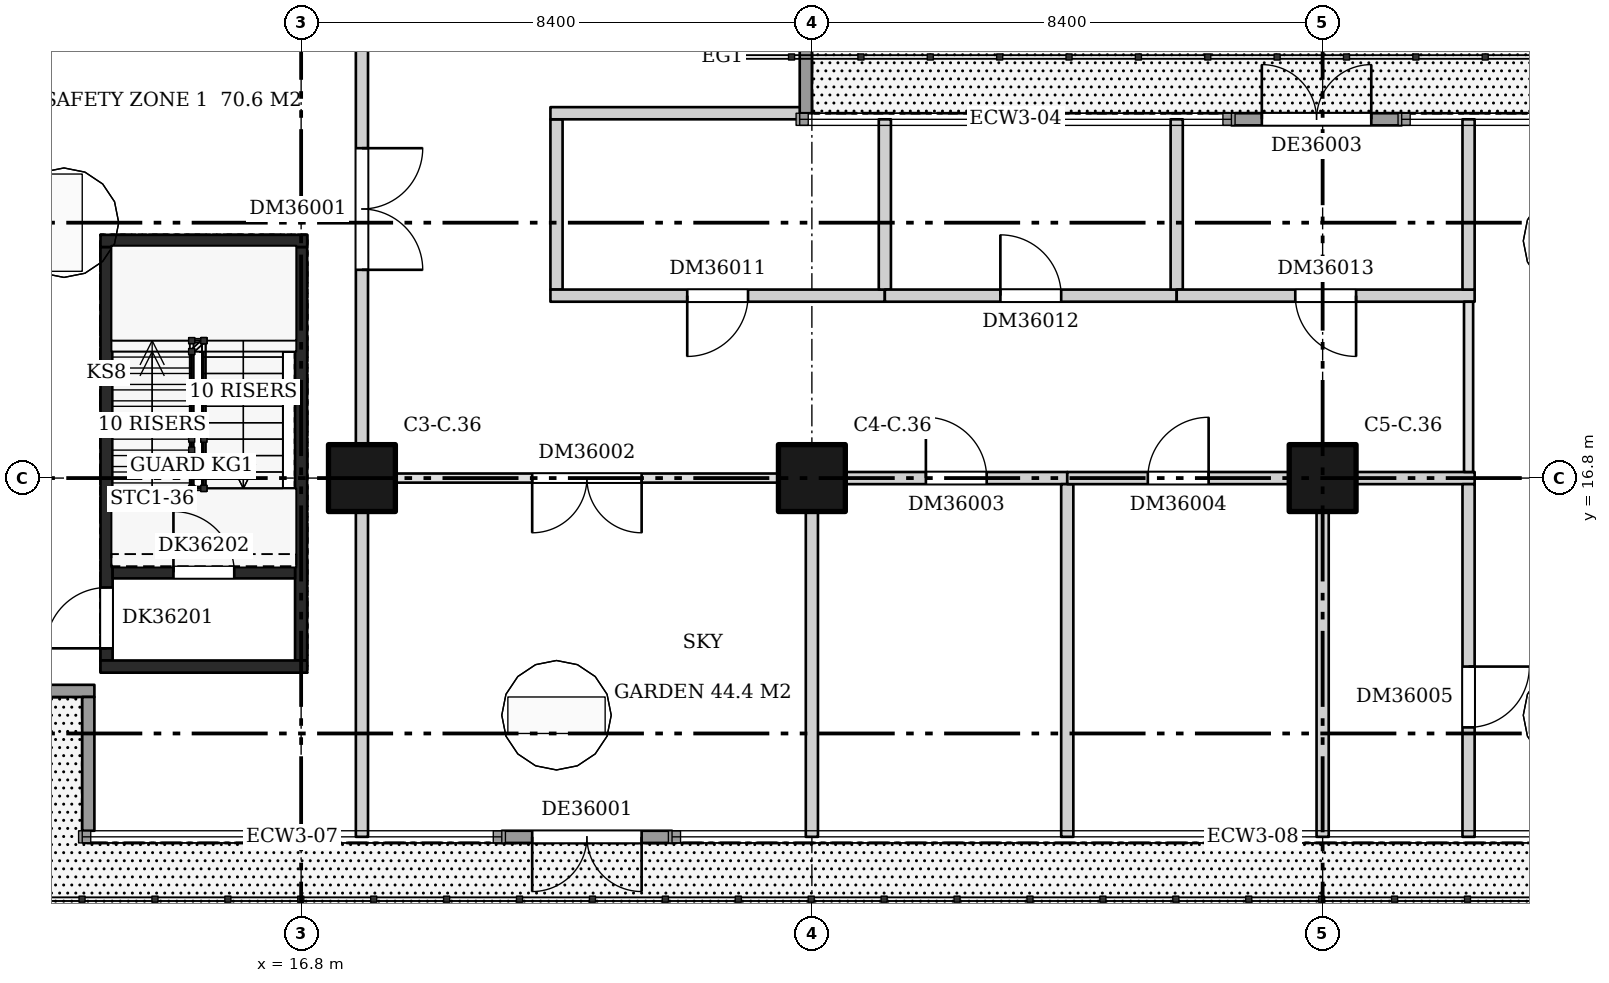
"""IFC4 building model, lengths in metres.
Left out: names, types, materials, properties, quantities, classifications, styles, units other than length and angle.
Written with IfcOpenShell. Run it as: python <this file> out.ifc"""

import sys

from ifc_helpers import new_model, si_unit, direction, frame, frame_2d, origin, origin_2d, place, context, subcontext, project, spatial, rectangle, extrude, element, fill, save


model = new_model("IFC4")
c1 = context("Model", 3, precision=1e-05, world=origin(), true_north=direction((0.0, 1.0)))
c2 = subcontext(c1, "Body", "Model", "MODEL_VIEW")
j1 = project(units=[si_unit("LENGTHUNIT", "METRE"), si_unit("PLANEANGLEUNIT", "RADIAN")], contexts=[c1])
p1 = place(None, origin())
s1 = spatial("IfcSite", under=j1, at=p1, CompositionType="ELEMENT")
p2 = place(p1, origin())
s2 = spatial("IfcBuilding", under=s1, at=p2, CompositionType="ELEMENT")
p3 = place(p2, frame((0.0, 0.0, 140.7)))
s3 = spatial("IfcBuildingStorey", under=s2, at=p3, CompositionType="ELEMENT", Elevation=140.7)
for number, where, z_axis, x_axis in (
    (1, (17.8, 16.8, 0.0), (0.0, 0.0, 1.0), (1.0, 0.0, 0.0)),
    (2, (25.2, 16.8, 0.0), (0.0, 0.0, 1.0), (1.0, 0.0, 0.0)),
    (3, (33.6, 16.8, 0.0), (0.0, 0.0, 1.0), (1.0, 0.0, 0.0)),
):
    element("IfcColumn", number, at=place(p3, frame(where, z_axis=z_axis, x_axis=x_axis)), inside=s3, PredefinedType="COLUMN", context=c2, shape_type="SweptSolid", body=[
        extrude(rectangle(XDim=1.1, YDim=1.1, at=origin_2d()), origin(), (0.0, 0.0, 1.0), 6.72),
    ])
p4 = place(p3, frame((13.6, 13.8, 0.0), z_axis=(0.0, 0.0, 1.0), x_axis=(0.0, 1.0, 0.0)))
e4 = element("IfcWall", 4, at=p4, inside=s3, PredefinedType="SHEAR", context=c2, shape_type="SweptSolid", body=[
    extrude(rectangle(XDim=6.8, YDim=0.2, at=frame_2d((3.4, 0.0))), origin(), (0.0, 0.0, 1.0), 6.72),
])
p5 = place(p4, frame((0.2, 0.0, 0.0)))
e5 = element("IfcOpeningElement", 5, at=p5, cuts=e4, PredefinedType="OPENING", context=c2, shape_type="SweptSolid", body=[
    extrude(rectangle(XDim=1.0, YDim=2.1, at=frame_2d((0.5, 1.05))), frame((0.0, 0.11, 0.0), z_axis=(0.0, -1.0, 0.0), x_axis=(1.0, 0.0, 0.0)), (0.0, 0.0, 1.0), 0.22),
])
p6 = place(p3, frame((16.8, 13.8, 0.0), z_axis=(0.0, 0.0, 1.0), x_axis=(0.0, 1.0, 0.0)))
e6 = element("IfcWall", 6, at=p6, inside=s3, PredefinedType="SHEAR", context=c2, shape_type="SweptSolid", body=[
    extrude(rectangle(XDim=6.8, YDim=0.2, at=frame_2d((3.4, 0.0))), origin(), (0.0, 0.0, 1.0), 6.72),
])
for number, where, z_axis, x_axis in (
    (7, (13.5, 13.7, 0.0), (0.0, 0.0, 1.0), (1.0, 0.0, 0.0)),
    (8, (13.5, 20.7, 0.0), (0.0, 0.0, 1.0), (1.0, 0.0, 0.0)),
):
    element("IfcWall", number, at=place(p3, frame(where, z_axis=z_axis, x_axis=x_axis)), inside=s3, PredefinedType="SHEAR", context=c2, shape_type="SweptSolid", body=[
        extrude(rectangle(XDim=3.4, YDim=0.2, at=frame_2d((1.7, 0.0))), origin(), (0.0, 0.0, 1.0), 6.72),
    ])
p7 = place(p3, frame((13.7, 15.25, 0.0), z_axis=(0.0, 0.0, 1.0), x_axis=(1.0, 0.0, 0.0)))
e9 = element("IfcWall", 9, at=p7, inside=s3, PredefinedType="SHEAR", context=c2, shape_type="SweptSolid", body=[
    extrude(rectangle(XDim=3.0, YDim=0.2, at=frame_2d((1.5, 0.0))), origin(), (0.0, 0.0, 1.0), 6.72),
])
p8 = place(p7, frame((1.0, 0.0, 0.0)))
e10 = element("IfcOpeningElement", 10, at=p8, cuts=e9, PredefinedType="OPENING", context=c2, shape_type="SweptSolid", body=[
    extrude(rectangle(XDim=1.0, YDim=2.1, at=frame_2d((0.5, 1.05))), frame((0.0, 0.11, 0.0), z_axis=(0.0, -1.0, 0.0), x_axis=(1.0, 0.0, 0.0)), (0.0, 0.0, 1.0), 0.22),
])
p9 = place(p3, frame((17.8, 10.9, 0.0), z_axis=(0.0, 0.0, 1.0), x_axis=(0.0, 1.0, 0.0)))
e11 = element("IfcWall", 11, at=p9, inside=s3, PredefinedType="PARTITIONING", context=c2, shape_type="SweptSolid", body=[
    extrude(rectangle(XDim=5.35, YDim=0.2, at=frame_2d((2.675, 0.0))), origin(), (0.0, 0.0, 1.0), 6.72),
])
p10 = place(p3, frame((17.8, 17.35, 0.0), z_axis=(0.0, 0.0, 1.0), x_axis=(0.0, 1.0, 0.0)))
e12 = element("IfcWall", 12, at=p10, inside=s3, PredefinedType="PARTITIONING", context=c2, shape_type="SweptSolid", body=[
    extrude(rectangle(XDim=7.75, YDim=0.2, at=frame_2d((3.875, 0.0))), origin(), (0.0, 0.0, 1.0), 6.72),
])
p11 = place(p10, frame((2.875, 0.0, 0.0)))
e13 = element("IfcOpeningElement", 13, at=p11, cuts=e12, PredefinedType="OPENING", context=c2, shape_type="SweptSolid", body=[
    extrude(rectangle(XDim=2.0, YDim=2.1, at=frame_2d((1.0, 1.05))), frame((0.0, 0.11, 0.0), z_axis=(0.0, -1.0, 0.0), x_axis=(1.0, 0.0, 0.0)), (0.0, 0.0, 1.0), 0.22),
])
p12 = place(p3, frame((18.35, 16.8, 0.0), z_axis=(0.0, 0.0, 1.0), x_axis=(1.0, 0.0, 0.0)))
e14 = element("IfcWall", 14, at=p12, inside=s3, PredefinedType="PARTITIONING", context=c2, shape_type="SweptSolid", body=[
    extrude(rectangle(XDim=6.3, YDim=0.15, at=frame_2d((3.15, 0.0))), origin(), (0.0, 0.0, 1.0), 6.72),
])
p13 = place(p12, frame((2.25, 0.0, 0.0)))
e15 = element("IfcOpeningElement", 15, at=p13, cuts=e14, PredefinedType="OPENING", context=c2, shape_type="SweptSolid", body=[
    extrude(rectangle(XDim=1.8, YDim=2.1, at=frame_2d((0.9, 1.05))), frame((0.0, 0.085, 0.0), z_axis=(0.0, -1.0, 0.0), x_axis=(1.0, 0.0, 0.0)), (0.0, 0.0, 1.0), 0.17),
])
p14 = place(p3, frame((21.0, 19.9, 0.0), z_axis=(0.0, 0.0, 1.0), x_axis=(0.0, 1.0, 0.0)))
e16 = element("IfcWall", 16, at=p14, inside=s3, PredefinedType="PARTITIONING", context=c2, shape_type="SweptSolid", body=[
    extrude(rectangle(XDim=2.8, YDim=0.2, at=frame_2d((1.4, 0.0))), origin(), (0.0, 0.0, 1.0), 6.72),
])
p15 = place(p3, frame((20.9, 19.8, 0.0), z_axis=(0.0, 0.0, 1.0), x_axis=(1.0, 0.0, 0.0)))
e17 = element("IfcWall", 17, at=p15, inside=s3, PredefinedType="PARTITIONING", context=c2, shape_type="SweptSolid", body=[
    extrude(rectangle(XDim=5.5, YDim=0.2, at=frame_2d((2.75, 0.0))), origin(), (0.0, 0.0, 1.0), 6.72),
])
p16 = place(p15, frame((2.25, 0.0, 0.0)))
e18 = element("IfcOpeningElement", 18, at=p16, cuts=e17, PredefinedType="OPENING", context=c2, shape_type="SweptSolid", body=[
    extrude(rectangle(XDim=1.0, YDim=2.1, at=frame_2d((0.5, 1.05))), frame((0.0, 0.11, 0.0), z_axis=(0.0, -1.0, 0.0), x_axis=(1.0, 0.0, 0.0)), (0.0, 0.0, 1.0), 0.22),
])
p17 = place(p3, frame((20.9, 22.8, 0.0), z_axis=(0.0, 0.0, 1.0), x_axis=(1.0, 0.0, 0.0)))
e19 = element("IfcWall", 19, at=p17, inside=s3, PredefinedType="PARTITIONING", context=c2, shape_type="SweptSolid", body=[
    extrude(rectangle(XDim=4.2, YDim=0.2, at=frame_2d((2.1, 0.0))), origin(), (0.0, 0.0, 1.0), 6.72),
])
p18 = place(p3, frame((25.2, 10.9, 0.0), z_axis=(0.0, 0.0, 1.0), x_axis=(0.0, 1.0, 0.0)))
e20 = element("IfcWall", 20, at=p18, inside=s3, PredefinedType="PARTITIONING", context=c2, shape_type="SweptSolid", body=[
    extrude(rectangle(XDim=5.35, YDim=0.2, at=frame_2d((2.675, 0.0))), origin(), (0.0, 0.0, 1.0), 6.72),
])
p19 = place(p3, frame((25.75, 16.8, 0.0), z_axis=(0.0, 0.0, 1.0), x_axis=(1.0, 0.0, 0.0)))
e21 = element("IfcWall", 21, at=p19, inside=s3, PredefinedType="PARTITIONING", context=c2, shape_type="SweptSolid", body=[
    extrude(rectangle(XDim=3.65, YDim=0.2, at=frame_2d((1.825, 0.0))), origin(), (0.0, 0.0, 1.0), 6.72),
])
p20 = place(p19, frame((1.325, 0.0, 0.0)))
e22 = element("IfcOpeningElement", 22, at=p20, cuts=e21, PredefinedType="OPENING", context=c2, shape_type="SweptSolid", body=[
    extrude(rectangle(XDim=1.0, YDim=2.1, at=frame_2d((0.5, 1.05))), frame((0.0, 0.11, 0.0), z_axis=(0.0, -1.0, 0.0), x_axis=(1.0, 0.0, 0.0)), (0.0, 0.0, 1.0), 0.22),
])
p21 = place(p3, frame((26.4, 19.9, 0.0), z_axis=(0.0, 0.0, 1.0), x_axis=(0.0, 1.0, 0.0)))
e23 = element("IfcWall", 23, at=p21, inside=s3, PredefinedType="PARTITIONING", context=c2, shape_type="SweptSolid", body=[
    extrude(rectangle(XDim=2.8, YDim=0.2, at=frame_2d((1.4, 0.0))), origin(), (0.0, 0.0, 1.0), 6.72),
])
p22 = place(p3, frame((26.4, 19.8, 0.0), z_axis=(0.0, 0.0, 1.0), x_axis=(1.0, 0.0, 0.0)))
e24 = element("IfcWall", 24, at=p22, inside=s3, PredefinedType="PARTITIONING", context=c2, shape_type="SweptSolid", body=[
    extrude(rectangle(XDim=4.8, YDim=0.2, at=frame_2d((2.4, 0.0))), origin(), (0.0, 0.0, 1.0), 6.72),
])
p23 = place(p22, frame((1.9, 0.0, 0.0)))
e25 = element("IfcOpeningElement", 25, at=p23, cuts=e24, PredefinedType="OPENING", context=c2, shape_type="SweptSolid", body=[
    extrude(rectangle(XDim=1.0, YDim=2.1, at=frame_2d((0.5, 1.05))), frame((0.0, 0.11, 0.0), z_axis=(0.0, -1.0, 0.0), x_axis=(1.0, 0.0, 0.0)), (0.0, 0.0, 1.0), 0.22),
])
p24 = place(p3, frame((29.4, 10.9, 0.0), z_axis=(0.0, 0.0, 1.0), x_axis=(0.0, 1.0, 0.0)))
e26 = element("IfcWall", 26, at=p24, inside=s3, PredefinedType="PARTITIONING", context=c2, shape_type="SweptSolid", body=[
    extrude(rectangle(XDim=5.8, YDim=0.2, at=frame_2d((2.9, 0.0))), origin(), (0.0, 0.0, 1.0), 6.72),
])
p25 = place(p3, frame((29.4, 16.8, 0.0), z_axis=(0.0, 0.0, 1.0), x_axis=(1.0, 0.0, 0.0)))
e27 = element("IfcWall", 27, at=p25, inside=s3, PredefinedType="PARTITIONING", context=c2, shape_type="SweptSolid", body=[
    extrude(rectangle(XDim=3.65, YDim=0.2, at=frame_2d((1.825, 0.0))), origin(), (0.0, 0.0, 1.0), 6.72),
])
p26 = place(p25, frame((1.325, 0.0, 0.0)))
e28 = element("IfcOpeningElement", 28, at=p26, cuts=e27, PredefinedType="OPENING", context=c2, shape_type="SweptSolid", body=[
    extrude(rectangle(XDim=1.0, YDim=2.1, at=frame_2d((0.5, 1.05))), frame((0.0, 0.11, 0.0), z_axis=(0.0, -1.0, 0.0), x_axis=(1.0, 0.0, 0.0)), (0.0, 0.0, 1.0), 0.22),
])
p27 = place(p3, frame((31.2, 19.9, 0.0), z_axis=(0.0, 0.0, 1.0), x_axis=(0.0, 1.0, 0.0)))
e29 = element("IfcWall", 29, at=p27, inside=s3, PredefinedType="PARTITIONING", context=c2, shape_type="SweptSolid", body=[
    extrude(rectangle(XDim=2.8, YDim=0.2, at=frame_2d((1.4, 0.0))), origin(), (0.0, 0.0, 1.0), 6.72),
])
p28 = place(p3, frame((31.2, 19.8, 0.0), z_axis=(0.0, 0.0, 1.0), x_axis=(1.0, 0.0, 0.0)))
e30 = element("IfcWall", 30, at=p28, inside=s3, PredefinedType="PARTITIONING", context=c2, shape_type="SweptSolid", body=[
    extrude(rectangle(XDim=4.9, YDim=0.2, at=frame_2d((2.45, 0.0))), origin(), (0.0, 0.0, 1.0), 6.72),
])
p29 = place(p28, frame((1.95, 0.0, 0.0)))
e31 = element("IfcOpeningElement", 31, at=p29, cuts=e30, PredefinedType="OPENING", context=c2, shape_type="SweptSolid", body=[
    extrude(rectangle(XDim=1.0, YDim=2.1, at=frame_2d((0.5, 1.05))), frame((0.0, 0.11, 0.0), z_axis=(0.0, -1.0, 0.0), x_axis=(1.0, 0.0, 0.0)), (0.0, 0.0, 1.0), 0.22),
])
p30 = place(p3, frame((33.6, 10.9, 0.0), z_axis=(0.0, 0.0, 1.0), x_axis=(0.0, 1.0, 0.0)))
e32 = element("IfcWall", 32, at=p30, inside=s3, PredefinedType="PARTITIONING", context=c2, shape_type="SweptSolid", body=[
    extrude(rectangle(XDim=5.35, YDim=0.2, at=frame_2d((2.675, 0.0))), origin(), (0.0, 0.0, 1.0), 6.72),
])
p31 = place(p3, frame((34.15, 16.8, 0.0), z_axis=(0.0, 0.0, 1.0), x_axis=(1.0, 0.0, 0.0)))
e33 = element("IfcWall", 33, at=p31, inside=s3, PredefinedType="PARTITIONING", context=c2, shape_type="SweptSolid", body=[
    extrude(rectangle(XDim=1.95, YDim=0.2, at=frame_2d((0.975, 0.0))), origin(), (0.0, 0.0, 1.0), 6.72),
])
p32 = place(p3, frame((36.0, 10.9, 0.0), z_axis=(0.0, 0.0, 1.0), x_axis=(0.0, 1.0, 0.0)))
e34 = element("IfcWall", 34, at=p32, inside=s3, PredefinedType="PARTITIONING", context=c2, shape_type="SweptSolid", body=[
    extrude(rectangle(XDim=5.8, YDim=0.2, at=frame_2d((2.9, 0.0))), origin(), (0.0, 0.0, 1.0), 6.72),
])
p33 = place(p32, frame((1.8, 0.0, 0.0)))
e35 = element("IfcOpeningElement", 35, at=p33, cuts=e34, PredefinedType="OPENING", context=c2, shape_type="SweptSolid", body=[
    extrude(rectangle(XDim=1.0, YDim=2.1, at=frame_2d((0.5, 1.05))), frame((0.0, 0.11, 0.0), z_axis=(0.0, -1.0, 0.0), x_axis=(1.0, 0.0, 0.0)), (0.0, 0.0, 1.0), 0.22),
])
p34 = place(p3, frame((36.0, 16.9, 0.0), z_axis=(0.0, 0.0, 1.0), x_axis=(0.0, 1.0, 0.0)))
e36 = element("IfcWall", 36, at=p34, inside=s3, PredefinedType="PARTITIONING", context=c2, shape_type="SweptSolid", body=[
    extrude(rectangle(XDim=2.8, YDim=0.15, at=frame_2d((1.4, 0.0))), origin(), (0.0, 0.0, 1.0), 6.72),
])
p35 = place(p3, frame((36.0, 19.9, 0.0), z_axis=(0.0, 0.0, 1.0), x_axis=(0.0, 1.0, 0.0)))
e37 = element("IfcWall", 37, at=p35, inside=s3, PredefinedType="PARTITIONING", context=c2, shape_type="SweptSolid", body=[
    extrude(rectangle(XDim=2.8, YDim=0.2, at=frame_2d((1.4, 0.0))), origin(), (0.0, 0.0, 1.0), 6.72),
])
p36 = place(p3, frame((10.8, 13.3, 0.0), z_axis=(0.0, 0.0, 1.0), x_axis=(1.0, 0.0, 0.0)))
e38 = element("IfcWall", 38, at=p36, inside=s3, PredefinedType="SOLIDWALL", context=c2, shape_type="SweptSolid", body=[
    extrude(rectangle(XDim=2.6, YDim=0.2, at=frame_2d((1.3, 0.0))), origin(), (0.0, 0.0, 1.0), 6.72),
])
p37 = place(p3, frame((13.3, 13.2, 0.0), z_axis=(0.0, 0.0, 1.0), x_axis=(0.0, -1.0, 0.0)))
e39 = element("IfcWall", 39, at=p37, inside=s3, PredefinedType="SOLIDWALL", context=c2, shape_type="SweptSolid", body=[
    extrude(rectangle(XDim=2.2, YDim=0.2, at=frame_2d((1.1, 0.0))), origin(), (0.0, 0.0, 1.0), 6.72),
])
p38 = place(p3, frame((20.1, 10.9, 0.0), z_axis=(0.0, 0.0, 1.0), x_axis=(1.0, 0.0, 0.0)))
e40 = element("IfcWall", 40, at=p38, inside=s3, PredefinedType="SOLIDWALL", context=c2, shape_type="SweptSolid", body=[
    extrude(rectangle(XDim=2.8, YDim=0.2, at=frame_2d((1.4, 0.0))), origin(), (0.0, 0.0, 1.0), 6.72),
])
p39 = place(p38, frame((0.5, 0.0, 0.0)))
e41 = element("IfcOpeningElement", 41, at=p39, cuts=e40, PredefinedType="OPENING", context=c2, shape_type="SweptSolid", body=[
    extrude(rectangle(XDim=1.8, YDim=2.4, at=frame_2d((0.9, 1.2))), frame((0.0, 0.11, 0.0), z_axis=(0.0, -1.0, 0.0), x_axis=(1.0, 0.0, 0.0)), (0.0, 0.0, 1.0), 0.22),
])
p40 = place(p3, frame((34.9, 22.7, 0.0), z_axis=(0.0, 0.0, 1.0), x_axis=(-1.0, 0.0, 0.0)))
e42 = element("IfcWall", 42, at=p40, inside=s3, PredefinedType="SOLIDWALL", context=c2, shape_type="SweptSolid", body=[
    extrude(rectangle(XDim=2.8, YDim=0.2, at=frame_2d((1.4, 0.0))), origin(), (0.0, 0.0, 1.0), 6.72),
])
p41 = place(p40, frame((0.5, 0.0, 0.0)))
e43 = element("IfcOpeningElement", 43, at=p41, cuts=e42, PredefinedType="OPENING", context=c2, shape_type="SweptSolid", body=[
    extrude(rectangle(XDim=1.8, YDim=2.4, at=frame_2d((0.9, 1.2))), frame((0.0, 0.11, 0.0), z_axis=(0.0, -1.0, 0.0), x_axis=(1.0, 0.0, 0.0)), (0.0, 0.0, 1.0), 0.22),
])
p42 = place(p3, frame((25.1, 22.8, 0.0), z_axis=(0.0, 0.0, 1.0), x_axis=(0.0, 1.0, 0.0)))
e44 = element("IfcWall", 44, at=p42, inside=s3, PredefinedType="SOLIDWALL", context=c2, shape_type="SweptSolid", body=[
    extrude(rectangle(XDim=1.8, YDim=0.2, at=frame_2d((0.9, 0.0))), origin(), (0.0, 0.0, 1.0), 6.72),
])
p43 = place(p5, origin())
e45 = element("IfcDoor", 45, at=p43, inside=s3, OperationType="SINGLE_SWING_LEFT", PredefinedType="DOOR", context=c2, shape_type="SweptSolid", body=[
    extrude(rectangle(XDim=1.0, YDim=2.1, at=frame_2d((0.5, 1.05))), frame((0.0, 0.025, 0.0), z_axis=(0.0, -1.0, 0.0), x_axis=(1.0, 0.0, 0.0)), (0.0, 0.0, 1.0), 0.05),
])
fill(e5, e45)
p44 = place(p8, origin())
e46 = element("IfcDoor", 46, at=p44, inside=s3, OperationType="SINGLE_SWING_LEFT", PredefinedType="DOOR", context=c2, shape_type="SweptSolid", body=[
    extrude(rectangle(XDim=1.0, YDim=2.1, at=frame_2d((0.5, 1.05))), frame((0.0, 0.025, 0.0), z_axis=(0.0, -1.0, 0.0), x_axis=(1.0, 0.0, 0.0)), (0.0, 0.0, 1.0), 0.05),
])
fill(e10, e46)
p45 = place(p11, frame((2.0, 0.0, 0.0), z_axis=(0.0, 0.0, 1.0), x_axis=(-1.0, 0.0, 0.0)))
e47 = element("IfcDoor", 47, at=p45, inside=s3, OperationType="DOUBLE_DOOR_SINGLE_SWING", PredefinedType="DOOR", context=c2, shape_type="SweptSolid", body=[
    extrude(rectangle(XDim=2.0, YDim=2.1, at=frame_2d((1.0, 1.05))), frame((0.0, 0.025, 0.0), z_axis=(0.0, -1.0, 0.0), x_axis=(1.0, 0.0, 0.0)), (0.0, 0.0, 1.0), 0.05),
])
fill(e13, e47)
p46 = place(p13, frame((1.8, 0.0, 0.0), z_axis=(0.0, 0.0, 1.0), x_axis=(-1.0, 0.0, 0.0)))
e48 = element("IfcDoor", 48, at=p46, inside=s3, OperationType="DOUBLE_DOOR_SINGLE_SWING", PredefinedType="DOOR", context=c2, shape_type="SweptSolid", body=[
    extrude(rectangle(XDim=1.8, YDim=2.1, at=frame_2d((0.9, 1.05))), frame((0.0, 0.025, 0.0), z_axis=(0.0, -1.0, 0.0), x_axis=(1.0, 0.0, 0.0)), (0.0, 0.0, 1.0), 0.05),
])
fill(e15, e48)
p47 = place(p20, origin())
e49 = element("IfcDoor", 49, at=p47, inside=s3, OperationType="SINGLE_SWING_LEFT", PredefinedType="DOOR", context=c2, shape_type="SweptSolid", body=[
    extrude(rectangle(XDim=1.0, YDim=2.1, at=frame_2d((0.5, 1.05))), frame((0.0, 0.025, 0.0), z_axis=(0.0, -1.0, 0.0), x_axis=(1.0, 0.0, 0.0)), (0.0, 0.0, 1.0), 0.05),
])
fill(e22, e49)
p48 = place(p26, origin())
e50 = element("IfcDoor", 50, at=p48, inside=s3, OperationType="SINGLE_SWING_RIGHT", PredefinedType="DOOR", context=c2, shape_type="SweptSolid", body=[
    extrude(rectangle(XDim=1.0, YDim=2.1, at=frame_2d((0.5, 1.05))), frame((0.0, 0.025, 0.0), z_axis=(0.0, -1.0, 0.0), x_axis=(1.0, 0.0, 0.0)), (0.0, 0.0, 1.0), 0.05),
])
fill(e28, e50)
p49 = place(p33, frame((1.0, 0.0, 0.0), z_axis=(0.0, 0.0, 1.0), x_axis=(-1.0, 0.0, 0.0)))
e51 = element("IfcDoor", 51, at=p49, inside=s3, OperationType="SINGLE_SWING_LEFT", PredefinedType="DOOR", context=c2, shape_type="SweptSolid", body=[
    extrude(rectangle(XDim=1.0, YDim=2.1, at=frame_2d((0.5, 1.05))), frame((0.0, 0.025, 0.0), z_axis=(0.0, -1.0, 0.0), x_axis=(1.0, 0.0, 0.0)), (0.0, 0.0, 1.0), 0.05),
])
fill(e35, e51)
p50 = place(p16, frame((1.0, 0.0, 0.0), z_axis=(0.0, 0.0, 1.0), x_axis=(-1.0, 0.0, 0.0)))
e52 = element("IfcDoor", 52, at=p50, inside=s3, OperationType="SINGLE_SWING_RIGHT", PredefinedType="DOOR", context=c2, shape_type="SweptSolid", body=[
    extrude(rectangle(XDim=1.0, YDim=2.1, at=frame_2d((0.5, 1.05))), frame((0.0, 0.025, 0.0), z_axis=(0.0, -1.0, 0.0), x_axis=(1.0, 0.0, 0.0)), (0.0, 0.0, 1.0), 0.05),
])
fill(e18, e52)
p51 = place(p23, origin())
e53 = element("IfcDoor", 53, at=p51, inside=s3, OperationType="SINGLE_SWING_LEFT", PredefinedType="DOOR", context=c2, shape_type="SweptSolid", body=[
    extrude(rectangle(XDim=1.0, YDim=2.1, at=frame_2d((0.5, 1.05))), frame((0.0, 0.025, 0.0), z_axis=(0.0, -1.0, 0.0), x_axis=(1.0, 0.0, 0.0)), (0.0, 0.0, 1.0), 0.05),
])
fill(e25, e53)
p52 = place(p29, frame((1.0, 0.0, 0.0), z_axis=(0.0, 0.0, 1.0), x_axis=(-1.0, 0.0, 0.0)))
e54 = element("IfcDoor", 54, at=p52, inside=s3, OperationType="SINGLE_SWING_LEFT", PredefinedType="DOOR", context=c2, shape_type="SweptSolid", body=[
    extrude(rectangle(XDim=1.0, YDim=2.1, at=frame_2d((0.5, 1.05))), frame((0.0, 0.025, 0.0), z_axis=(0.0, -1.0, 0.0), x_axis=(1.0, 0.0, 0.0)), (0.0, 0.0, 1.0), 0.05),
])
fill(e31, e54)
p53 = place(p39, frame((1.8, 0.0, 0.0), z_axis=(0.0, 0.0, 1.0), x_axis=(-1.0, 0.0, 0.0)))
e55 = element("IfcDoor", 55, at=p53, inside=s3, OperationType="DOUBLE_DOOR_SINGLE_SWING", PredefinedType="DOOR", context=c2, shape_type="SweptSolid", body=[
    extrude(rectangle(XDim=1.8, YDim=2.4, at=frame_2d((0.9, 1.2))), frame((0.0, 0.025, 0.0), z_axis=(0.0, -1.0, 0.0), x_axis=(1.0, 0.0, 0.0)), (0.0, 0.0, 1.0), 0.05),
])
fill(e41, e55)
p54 = place(p41, frame((1.8, 0.0, 0.0), z_axis=(0.0, 0.0, 1.0), x_axis=(-1.0, 0.0, 0.0)))
e56 = element("IfcDoor", 56, at=p54, inside=s3, OperationType="DOUBLE_DOOR_SINGLE_SWING", PredefinedType="DOOR", context=c2, shape_type="SweptSolid", body=[
    extrude(rectangle(XDim=1.8, YDim=2.4, at=frame_2d((0.9, 1.2))), frame((0.0, 0.025, 0.0), z_axis=(0.0, -1.0, 0.0), x_axis=(1.0, 0.0, 0.0)), (0.0, 0.0, 1.0), 0.05),
])
fill(e43, e56)
save(model, sys.argv[1])
